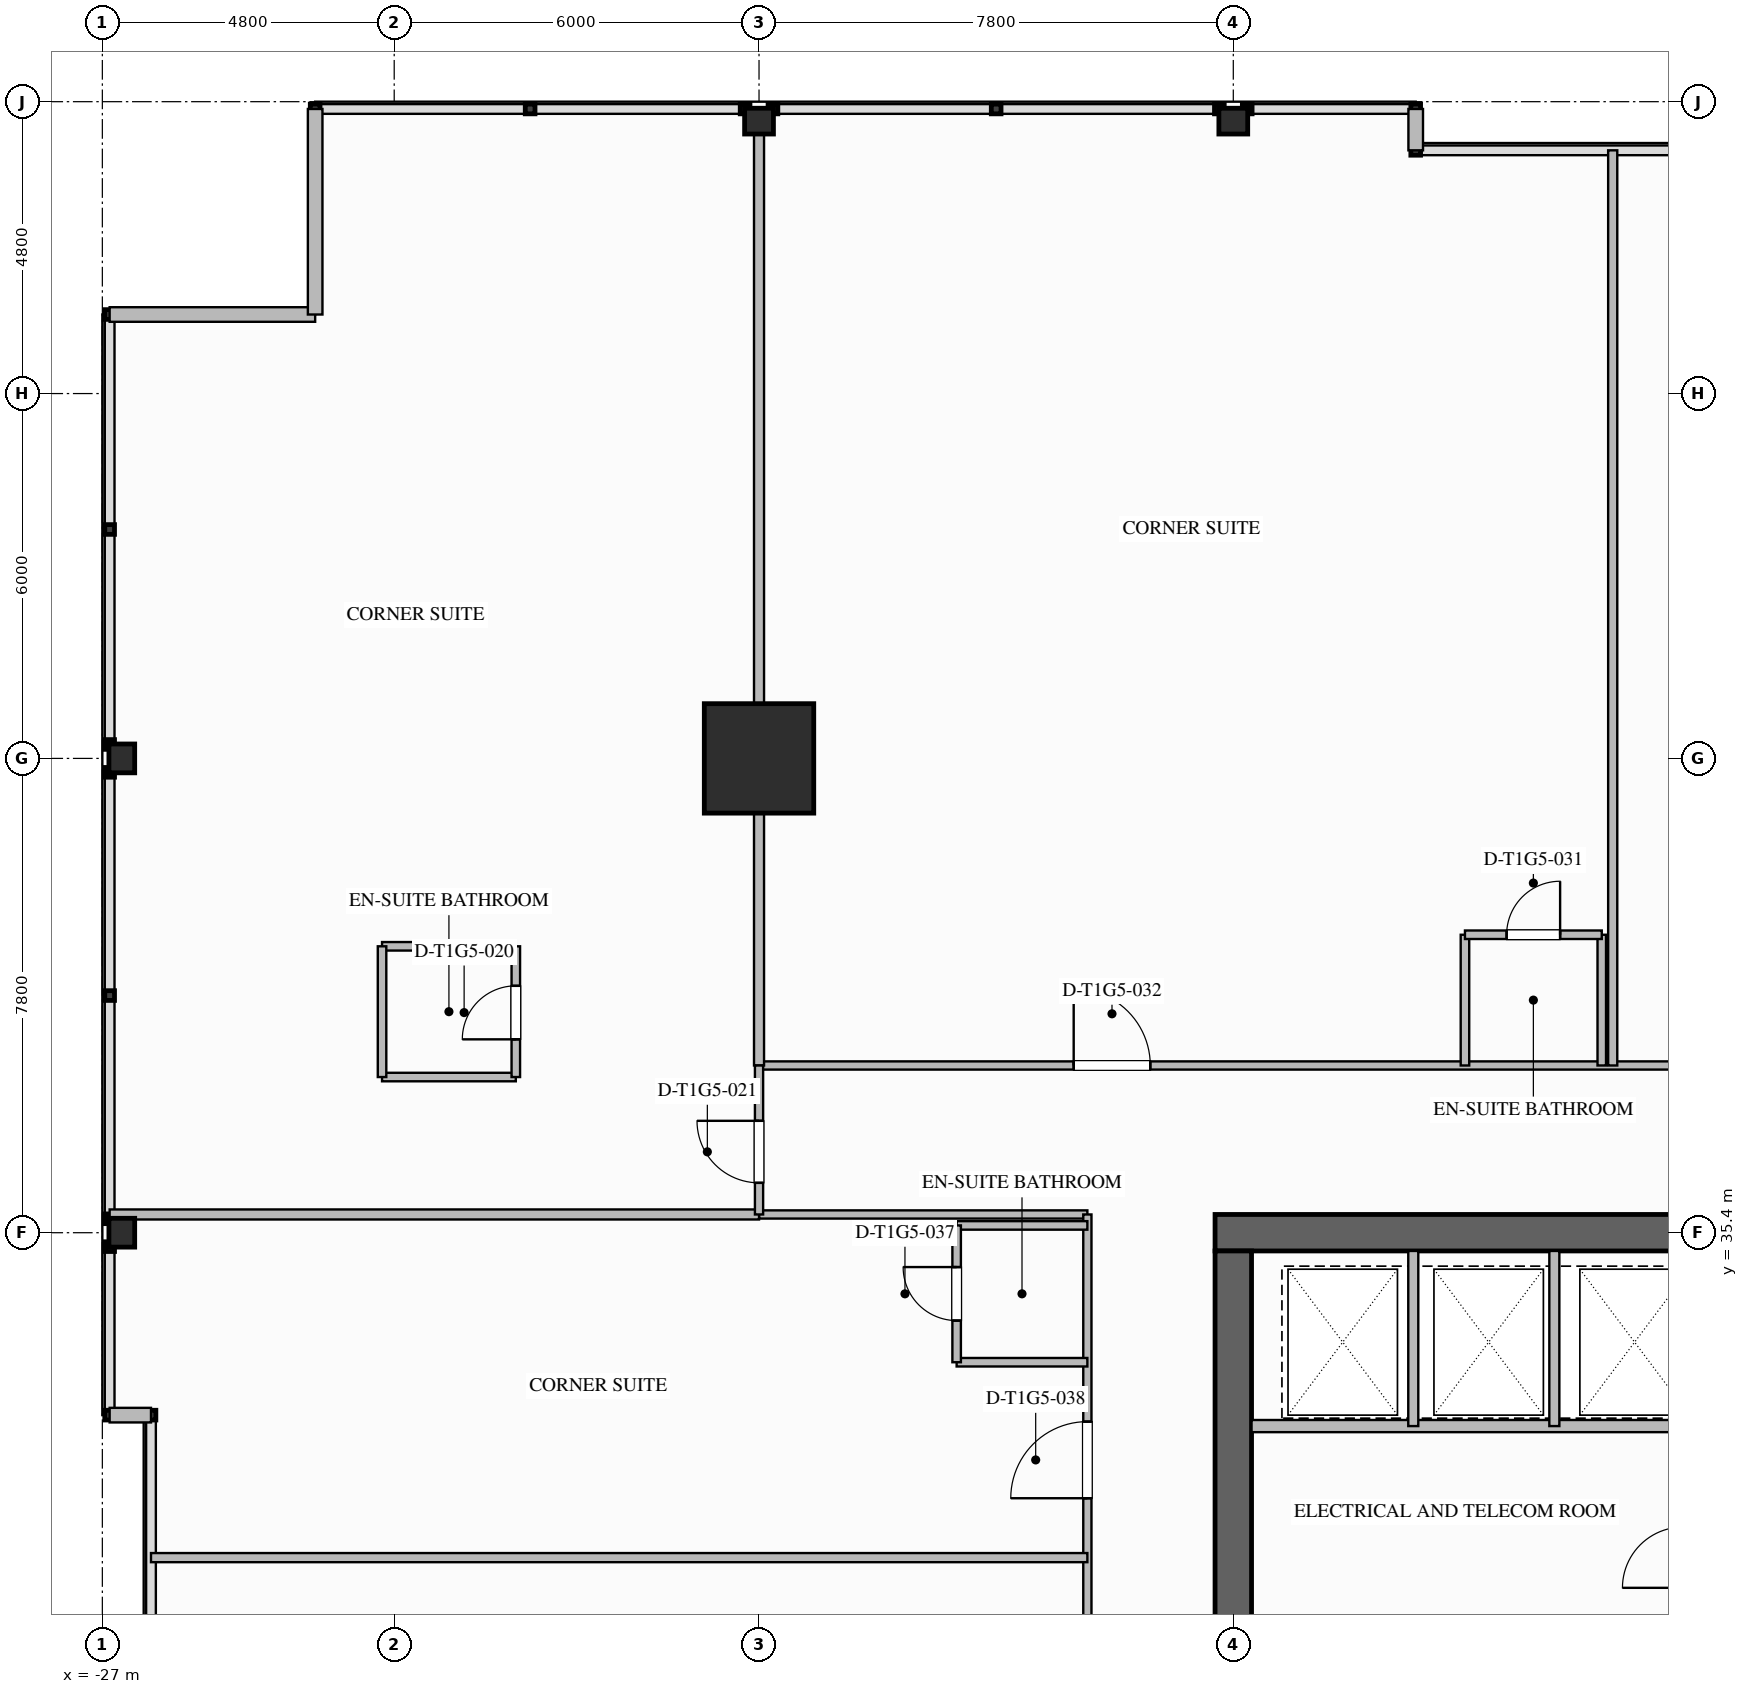
"""IFC4 building model, lengths in metres.
Left out: names, types, materials, properties, quantities, classifications, styles, units other than length and angle.
Written with IfcOpenShell. Run it as: python <this file> out.ifc"""

import sys

from ifc_helpers import new_model, si_unit, direction, frame, frame_2d, origin, origin_2d, place, context, subcontext, project, spatial, rectangle, i_section, extrude, element, fill, save


model = new_model("IFC4")
c1 = context("Model", 3, precision=1e-05, world=origin(), true_north=direction((0.0, 1.0)))
c2 = subcontext(c1, "Body", "Model", "MODEL_VIEW")
j1 = project(units=[si_unit("LENGTHUNIT", "METRE"), si_unit("PLANEANGLEUNIT", "RADIAN")], contexts=[c1])
p1 = place(None, origin())
s1 = spatial("IfcSite", under=j1, at=p1, CompositionType="ELEMENT")
p2 = place(p1, origin())
s2 = spatial("IfcBuilding", under=s1, at=p2, CompositionType="ELEMENT")
p3 = place(p2, frame((0.0, 0.0, 75.2)))
s3 = spatial("IfcBuildingStorey", under=s2, at=p3, CompositionType="ELEMENT", Elevation=75.2)
p4 = place(p3, frame((-8.7, 35.4, 0.0), z_axis=(0.0, 0.0, 1.0), x_axis=(1.0, 0.0, 0.0)))
e1 = element("IfcWall", 1, at=p4, inside=s3, PredefinedType="SHEAR", context=c2, shape_type="SweptSolid", body=[
    extrude(rectangle(XDim=17.4, YDim=0.6, at=frame_2d((8.7, 0.0))), origin(), (0.0, 0.0, 1.0), 3.5),
])
p5 = place(p3, frame((-8.4, 18.9, 0.0), z_axis=(0.0, 0.0, 1.0), x_axis=(0.0, 1.0, 0.0)))
e2 = element("IfcWall", 2, at=p5, inside=s3, PredefinedType="SHEAR", context=c2, shape_type="SweptSolid", body=[
    extrude(rectangle(XDim=16.2, YDim=0.6, at=frame_2d((8.1, 0.0))), origin(), (0.0, 0.0, 1.0), 3.5),
])
p6 = place(p5, frame((3.9, 0.0, 0.0)))
e3 = element("IfcOpeningElement", 3, at=p6, cuts=e2, PredefinedType="OPENING", context=c2, shape_type="SweptSolid", body=[
    extrude(rectangle(XDim=1.08, YDim=2.04, at=frame_2d((0.54, 1.02))), frame((0.0, 0.31, 0.0), z_axis=(0.0, -1.0, 0.0), x_axis=(1.0, 0.0, 0.0)), (0.0, 0.0, 1.0), 0.62),
])
p7 = place(p3, frame((-16.2, 43.2, 0.0), z_axis=(0.0, 0.0, 1.0), x_axis=(1.0, 0.0, 0.0)))
e4 = element("IfcColumn", 4, at=p7, inside=s3, PredefinedType="COLUMN", context=c2, shape_type="SweptSolid", body=[
    extrude(rectangle(XDim=1.8, YDim=1.8, at=origin_2d()), origin(), (0.0, 0.0, 1.0), 3.5),
])
for number, where, z_axis, x_axis in (
    (5, (-26.68, 35.4, 0.0), (0.0, 0.0, 1.0), (1.0, 0.0, 0.0)),
    (6, (-26.68, 43.2, 0.0), (0.0, 0.0, 1.0), (1.0, 0.0, 0.0)),
    (7, (-16.2, 53.68, 0.0), (0.0, 0.0, 1.0), (0.0, 1.0, 0.0)),
    (8, (-8.4, 53.68, 0.0), (0.0, 0.0, 1.0), (0.0, 1.0, 0.0)),
):
    element("IfcColumn", number, at=place(p3, frame(where, z_axis=z_axis, x_axis=x_axis)), inside=s3, PredefinedType="COLUMN", context=c2, shape_type="SweptSolid", body=[
        extrude(i_section(OverallWidth=0.424, OverallDepth=0.474, WebThickness=0.048, FlangeThickness=0.077, FilletRadius=0.03, at=origin_2d()), origin(), (0.0, 0.0, 1.0), 3.497),
    ])
for number, where, z_axis, x_axis in (
    (9, (-26.88, 50.5, 0.0), (0.0, 0.0, 1.0), (1.0, 0.0, 0.0)),
    (10, (-23.5, 50.5, 0.0), (0.0, 0.0, 1.0), (0.0, 1.0, 0.0)),
):
    element("IfcWall", number, at=place(p3, frame(where, z_axis=z_axis, x_axis=x_axis)), inside=s3, PredefinedType="STANDARD", context=c2, shape_type="SweptSolid", body=[
        extrude(rectangle(XDim=3.38, YDim=0.24, at=frame_2d((1.69, 0.0))), origin(), (0.0, 0.0, 1.0), 3.24),
    ])
for number, where, z_axis, x_axis in (
    (11, (-26.2, 32.4, 0.0), (0.0, 0.0, 1.0), (-1.0, 0.0, 0.0)),
    (12, (-5.4, 53.88, 0.0), (0.0, 0.0, 1.0), (0.0, -1.0, 0.0)),
):
    element("IfcWall", number, at=place(p3, frame(where, z_axis=z_axis, x_axis=x_axis)), inside=s3, PredefinedType="STANDARD", context=c2, shape_type="SweptSolid", body=[
        extrude(rectangle(XDim=0.68, YDim=0.24, at=frame_2d((0.34, 0.0))), origin(), (0.0, 0.0, 1.0), 3.24),
    ])
p8 = place(p3, frame((-8.1, 32.22, 0.0), z_axis=(0.0, 0.0, 1.0), x_axis=(1.0, 0.0, 0.0)))
e13 = element("IfcWall", 13, at=p8, inside=s3, PredefinedType="SOLIDWALL", context=c2, shape_type="SweptSolid", body=[
    extrude(rectangle(XDim=7.1, YDim=0.2, at=frame_2d((3.55, 0.0))), origin(), (0.0, 0.0, 1.0), 3.24),
])
for number, where, z_axis, x_axis in (
    (14, (-5.44, 32.22, 0.0), (0.0, 0.0, 1.0), (0.0, 1.0, 0.0)),
    (15, (-3.12, 32.22, 0.0), (0.0, 0.0, 1.0), (0.0, 1.0, 0.0)),
):
    element("IfcWall", number, at=place(p3, frame(where, z_axis=z_axis, x_axis=x_axis)), inside=s3, PredefinedType="PARTITIONING", context=c2, shape_type="SweptSolid", body=[
        extrude(rectangle(XDim=2.88, YDim=0.165, at=frame_2d((1.44, 0.0))), origin(), (0.0, 0.0, 1.0), 3.24),
    ])
p9 = place(p3, frame((-16.2, 38.15, 0.0), z_axis=(0.0, 0.0, 1.0), x_axis=(1.0, 0.0, 0.0)))
e16 = element("IfcWall", 16, at=p9, inside=s3, PredefinedType="PARTITIONING", context=c2, shape_type="SweptSolid", body=[
    extrude(rectangle(XDim=32.4, YDim=0.135, at=frame_2d((16.2, 0.0))), origin(), (0.0, 0.0, 1.0), 3.24),
])
p10 = place(p9, frame((5.175, 0.0, 0.0)))
e17 = element("IfcOpeningElement", 17, at=p10, cuts=e16, PredefinedType="OPENING", context=c2, shape_type="SweptSolid", body=[
    extrude(rectangle(XDim=1.26, YDim=2.2, at=frame_2d((0.63, 1.1))), frame((0.0, 0.077, 0.0), z_axis=(0.0, -1.0, 0.0), x_axis=(1.0, 0.0, 0.0)), (0.0, 0.0, 1.0), 0.155),
])
p11 = place(p9, frame((22.71, 0.0, 0.0)))
e18 = element("IfcOpeningElement", 18, at=p11, cuts=e16, PredefinedType="OPENING", context=c2, shape_type="SweptSolid", body=[
    extrude(rectangle(XDim=1.02, YDim=2.15, at=frame_2d((0.51, 1.075))), frame((0.0, 0.077, 0.0), z_axis=(0.0, -1.0, 0.0), x_axis=(1.0, 0.0, 0.0)), (0.0, 0.0, 1.0), 0.155),
])
p12 = place(p3, frame((-16.2, 35.7, 0.0), z_axis=(0.0, 0.0, 1.0), x_axis=(1.0, 0.0, 0.0)))
e19 = element("IfcWall", 19, at=p12, inside=s3, PredefinedType="PARTITIONING", context=c2, shape_type="SweptSolid", body=[
    extrude(rectangle(XDim=5.4, YDim=0.135, at=frame_2d((2.7, 0.0))), origin(), (0.0, 0.0, 1.0), 3.24),
])
p13 = place(p3, frame((-10.8, 18.3, 0.0), z_axis=(0.0, 0.0, 1.0), x_axis=(0.0, 1.0, 0.0)))
e20 = element("IfcWall", 20, at=p13, inside=s3, PredefinedType="PARTITIONING", context=c2, shape_type="SweptSolid", body=[
    extrude(rectangle(XDim=17.4, YDim=0.135, at=frame_2d((8.7, 0.0))), origin(), (0.0, 0.0, 1.0), 3.24),
])
p14 = place(p13, frame((1.682, 0.0, 0.0)))
e21 = element("IfcOpeningElement", 21, at=p14, cuts=e20, PredefinedType="OPENING", context=c2, shape_type="SweptSolid", body=[
    extrude(rectangle(XDim=1.26, YDim=2.2, at=frame_2d((0.63, 1.1))), frame((0.0, 0.077, 0.0), z_axis=(0.0, -1.0, 0.0), x_axis=(1.0, 0.0, 0.0)), (0.0, 0.0, 1.0), 0.155),
])
p15 = place(p13, frame((8.896, 0.0, 0.0)))
e22 = element("IfcOpeningElement", 22, at=p15, cuts=e20, PredefinedType="OPENING", context=c2, shape_type="SweptSolid", body=[
    extrude(rectangle(XDim=1.02, YDim=2.15, at=frame_2d((0.51, 1.075))), frame((0.0, 0.077, 0.0), z_axis=(0.0, -1.0, 0.0), x_axis=(1.0, 0.0, 0.0)), (0.0, 0.0, 1.0), 0.155),
])
p16 = place(p13, frame((12.733, 0.0, 0.0)))
e23 = element("IfcOpeningElement", 23, at=p16, cuts=e20, PredefinedType="OPENING", context=c2, shape_type="SweptSolid", body=[
    extrude(rectangle(XDim=1.26, YDim=2.2, at=frame_2d((0.63, 1.1))), frame((0.0, 0.077, 0.0), z_axis=(0.0, -1.0, 0.0), x_axis=(1.0, 0.0, 0.0)), (0.0, 0.0, 1.0), 0.155),
])
p17 = place(p3, frame((-16.2, 38.15, 0.0), z_axis=(0.0, 0.0, 1.0), x_axis=(0.0, 1.0, 0.0)))
e24 = element("IfcWall", 24, at=p17, inside=s3, PredefinedType="PARTITIONING", context=c2, shape_type="SweptSolid", body=[
    extrude(rectangle(XDim=15.73, YDim=0.165, at=frame_2d((7.865, 0.0))), origin(), (0.0, 0.0, 1.0), 2.452),
])
p18 = place(p3, frame((-26.88, 35.7, 0.0), z_axis=(0.0, 0.0, 1.0), x_axis=(1.0, 0.0, 0.0)))
e25 = element("IfcWall", 25, at=p18, inside=s3, PredefinedType="PARTITIONING", context=c2, shape_type="SweptSolid", body=[
    extrude(rectangle(XDim=10.68, YDim=0.165, at=frame_2d((5.34, 0.0))), origin(), (0.0, 0.0, 1.0), 2.452),
])
p19 = place(p3, frame((-16.2, 35.7, 0.0), z_axis=(0.0, 0.0, 1.0), x_axis=(0.0, 1.0, 0.0)))
e26 = element("IfcWall", 26, at=p19, inside=s3, PredefinedType="PARTITIONING", context=c2, shape_type="SweptSolid", body=[
    extrude(rectangle(XDim=2.45, YDim=0.135, at=frame_2d((1.225, 0.0))), origin(), (0.0, 0.0, 1.0), 2.452),
])
p20 = place(p19, frame((0.52, 0.0, 0.0)))
e27 = element("IfcOpeningElement", 27, at=p20, cuts=e26, PredefinedType="OPENING", context=c2, shape_type="SweptSolid", body=[
    extrude(rectangle(XDim=1.02, YDim=2.15, at=frame_2d((0.51, 1.075))), frame((0.0, 0.077, 0.0), z_axis=(0.0, -1.0, 0.0), x_axis=(1.0, 0.0, 0.0)), (0.0, 0.0, 1.0), 0.155),
])
for number, where, z_axis, x_axis in (
    (28, (-22.4, 37.96, 0.0), (0.0, 0.0, 1.0), (1.0, 0.0, 0.0)),
    (29, (-22.4, 40.11, 0.0), (0.0, 0.0, 1.0), (1.0, 0.0, 0.0)),
):
    element("IfcWall", number, at=place(p3, frame(where, z_axis=z_axis, x_axis=x_axis)), inside=s3, PredefinedType="PLUMBINGWALL", context=c2, shape_type="SweptSolid", body=[
        extrude(rectangle(XDim=2.2, YDim=0.14, at=frame_2d((1.1, 0.0))), origin(), (0.0, 0.0, 1.0), 3.24),
    ])
p21 = place(p3, frame((-22.4, 37.96, 0.0), z_axis=(0.0, 0.0, 1.0), x_axis=(0.0, 1.0, 0.0)))
e30 = element("IfcWall", 30, at=p21, inside=s3, PredefinedType="PLUMBINGWALL", context=c2, shape_type="SweptSolid", body=[
    extrude(rectangle(XDim=2.15, YDim=0.14, at=frame_2d((1.075, 0.0))), origin(), (0.0, 0.0, 1.0), 3.24),
])
p22 = place(p3, frame((-20.2, 37.96, 0.0), z_axis=(0.0, 0.0, 1.0), x_axis=(0.0, 1.0, 0.0)))
e31 = element("IfcWall", 31, at=p22, inside=s3, PredefinedType="PLUMBINGWALL", context=c2, shape_type="SweptSolid", body=[
    extrude(rectangle(XDim=2.15, YDim=0.14, at=frame_2d((1.075, 0.0))), origin(), (0.0, 0.0, 1.0), 3.24),
])
p23 = place(p22, frame((0.62, 0.0, 0.0)))
e32 = element("IfcOpeningElement", 32, at=p23, cuts=e31, PredefinedType="OPENING", context=c2, shape_type="SweptSolid", body=[
    extrude(rectangle(XDim=0.88, YDim=2.1, at=frame_2d((0.44, 1.05))), frame((0.0, 0.08, 0.0), z_axis=(0.0, -1.0, 0.0), x_axis=(1.0, 0.0, 0.0)), (0.0, 0.0, 1.0), 0.16),
])
for number, where, z_axis, x_axis in (
    (33, (-4.59, 38.15, 0.0), (0.0, 0.0, 1.0), (0.0, 1.0, 0.0)),
    (34, (-2.34, 38.15, 0.0), (0.0, 0.0, 1.0), (0.0, 1.0, 0.0)),
):
    element("IfcWall", number, at=place(p3, frame(where, z_axis=z_axis, x_axis=x_axis)), inside=s3, PredefinedType="PLUMBINGWALL", context=c2, shape_type="SweptSolid", body=[
        extrude(rectangle(XDim=2.15, YDim=0.14, at=frame_2d((1.075, 0.0))), origin(), (0.0, 0.0, 1.0), 3.24),
    ])
p24 = place(p3, frame((-4.59, 40.3, 0.0), z_axis=(0.0, 0.0, 1.0), x_axis=(1.0, 0.0, 0.0)))
e35 = element("IfcWall", 35, at=p24, inside=s3, PredefinedType="PLUMBINGWALL", context=c2, shape_type="SweptSolid", body=[
    extrude(rectangle(XDim=2.25, YDim=0.14, at=frame_2d((1.125, 0.0))), origin(), (0.0, 0.0, 1.0), 3.24),
])
p25 = place(p24, frame((0.685, 0.0, 0.0)))
e36 = element("IfcOpeningElement", 36, at=p25, cuts=e35, PredefinedType="OPENING", context=c2, shape_type="SweptSolid", body=[
    extrude(rectangle(XDim=0.88, YDim=2.1, at=frame_2d((0.44, 1.05))), frame((0.0, 0.08, 0.0), z_axis=(0.0, -1.0, 0.0), x_axis=(1.0, 0.0, 0.0)), (0.0, 0.0, 1.0), 0.16),
])
p26 = place(p3, frame((-2.16, 38.15, 0.0), z_axis=(0.0, 0.0, 1.0), x_axis=(0.0, 1.0, 0.0)))
e37 = element("IfcWall", 37, at=p26, inside=s3, PredefinedType="PARTITIONING", context=c2, shape_type="SweptSolid", body=[
    extrude(rectangle(XDim=15.05, YDim=0.15, at=frame_2d((7.525, 0.0))), origin(), (0.0, 0.0, 1.0), 3.24),
])
p27 = place(p3, frame((-26.2, 30.057, 0.0), z_axis=(0.0, 0.0, 1.0), x_axis=(1.0, 0.0, 0.0)))
e38 = element("IfcWall", 38, at=p27, inside=s3, PredefinedType="PARTITIONING", context=c2, shape_type="SweptSolid", body=[
    extrude(rectangle(XDim=15.4, YDim=0.15, at=frame_2d((7.7, 0.0))), origin(), (0.0, 0.0, 1.0), 3.24),
])
p28 = place(p3, frame((-10.8, 33.27, 0.0), z_axis=(0.0, 0.0, 1.0), x_axis=(-1.0, 0.0, 0.0)))
e39 = element("IfcWall", 39, at=p28, inside=s3, PredefinedType="PLUMBINGWALL", context=c2, shape_type="SweptSolid", body=[
    extrude(rectangle(XDim=2.15, YDim=0.14, at=frame_2d((1.075, 0.0))), origin(), (0.0, 0.0, 1.0), 3.24),
])
p29 = place(p3, frame((-10.8, 35.52, 0.0), z_axis=(0.0, 0.0, 1.0), x_axis=(-1.0, 0.0, 0.0)))
e40 = element("IfcWall", 40, at=p29, inside=s3, PredefinedType="PLUMBINGWALL", context=c2, shape_type="SweptSolid", body=[
    extrude(rectangle(XDim=2.15, YDim=0.14, at=frame_2d((1.075, 0.0))), origin(), (0.0, 0.0, 1.0), 2.617),
])
p30 = place(p3, frame((-12.95, 33.27, 0.0), z_axis=(0.0, 0.0, 1.0), x_axis=(0.0, 1.0, 0.0)))
e41 = element("IfcWall", 41, at=p30, inside=s3, PredefinedType="PLUMBINGWALL", context=c2, shape_type="SweptSolid", body=[
    extrude(rectangle(XDim=2.25, YDim=0.14, at=frame_2d((1.125, 0.0))), origin(), (0.0, 0.0, 1.0), 3.24),
])
p31 = place(p30, frame((0.685, 0.0, 0.0)))
e42 = element("IfcOpeningElement", 42, at=p31, cuts=e41, PredefinedType="OPENING", context=c2, shape_type="SweptSolid", body=[
    extrude(rectangle(XDim=0.88, YDim=2.1, at=frame_2d((0.44, 1.05))), frame((0.0, 0.08, 0.0), z_axis=(0.0, -1.0, 0.0), x_axis=(1.0, 0.0, 0.0)), (0.0, 0.0, 1.0), 0.16),
])
p32 = place(p23, origin())
e43 = element("IfcDoor", 43, at=p32, inside=s3, OperationType="SINGLE_SWING_LEFT", PredefinedType="DOOR", context=c2, shape_type="SweptSolid", body=[
    extrude(rectangle(XDim=0.88, YDim=2.1, at=frame_2d((0.44, 1.05))), frame((0.0, 0.025, 0.0), z_axis=(0.0, -1.0, 0.0), x_axis=(1.0, 0.0, 0.0)), (0.0, 0.0, 1.0), 0.05),
])
fill(e32, e43)
p33 = place(p20, origin())
e44 = element("IfcDoor", 44, at=p33, inside=s3, OperationType="SINGLE_SWING_RIGHT", PredefinedType="DOOR", context=c2, shape_type="SweptSolid", body=[
    extrude(rectangle(XDim=1.02, YDim=2.15, at=frame_2d((0.51, 1.075))), frame((0.0, 0.025, 0.0), z_axis=(0.0, -1.0, 0.0), x_axis=(1.0, 0.0, 0.0)), (0.0, 0.0, 1.0), 0.05),
])
fill(e27, e44)
p34 = place(p25, origin())
e45 = element("IfcDoor", 45, at=p34, inside=s3, OperationType="SINGLE_SWING_RIGHT", PredefinedType="DOOR", context=c2, shape_type="SweptSolid", body=[
    extrude(rectangle(XDim=0.88, YDim=2.1, at=frame_2d((0.44, 1.05))), frame((0.0, 0.025, 0.0), z_axis=(0.0, -1.0, 0.0), x_axis=(1.0, 0.0, 0.0)), (0.0, 0.0, 1.0), 0.05),
])
fill(e36, e45)
p35 = place(p10, origin())
e46 = element("IfcDoor", 46, at=p35, inside=s3, OperationType="SINGLE_SWING_LEFT", PredefinedType="DOOR", context=c2, shape_type="SweptSolid", body=[
    extrude(rectangle(XDim=1.26, YDim=2.2, at=frame_2d((0.63, 1.1))), frame((0.0, 0.025, 0.0), z_axis=(0.0, -1.0, 0.0), x_axis=(1.0, 0.0, 0.0)), (0.0, 0.0, 1.0), 0.05),
])
fill(e17, e46)
p36 = place(p31, origin())
e47 = element("IfcDoor", 47, at=p36, inside=s3, OperationType="SINGLE_SWING_RIGHT", PredefinedType="DOOR", context=c2, shape_type="SweptSolid", body=[
    extrude(rectangle(XDim=0.88, YDim=2.1, at=frame_2d((0.44, 1.05))), frame((0.0, 0.025, 0.0), z_axis=(0.0, -1.0, 0.0), x_axis=(1.0, 0.0, 0.0)), (0.0, 0.0, 1.0), 0.05),
])
fill(e42, e47)
p37 = place(p16, origin())
e48 = element("IfcDoor", 48, at=p37, inside=s3, OperationType="SINGLE_SWING_LEFT", PredefinedType="DOOR", context=c2, shape_type="SweptSolid", body=[
    extrude(rectangle(XDim=1.26, YDim=2.2, at=frame_2d((0.63, 1.1))), frame((0.0, 0.025, 0.0), z_axis=(0.0, -1.0, 0.0), x_axis=(1.0, 0.0, 0.0)), (0.0, 0.0, 1.0), 0.05),
])
fill(e23, e48)
save(model, sys.argv[1])
